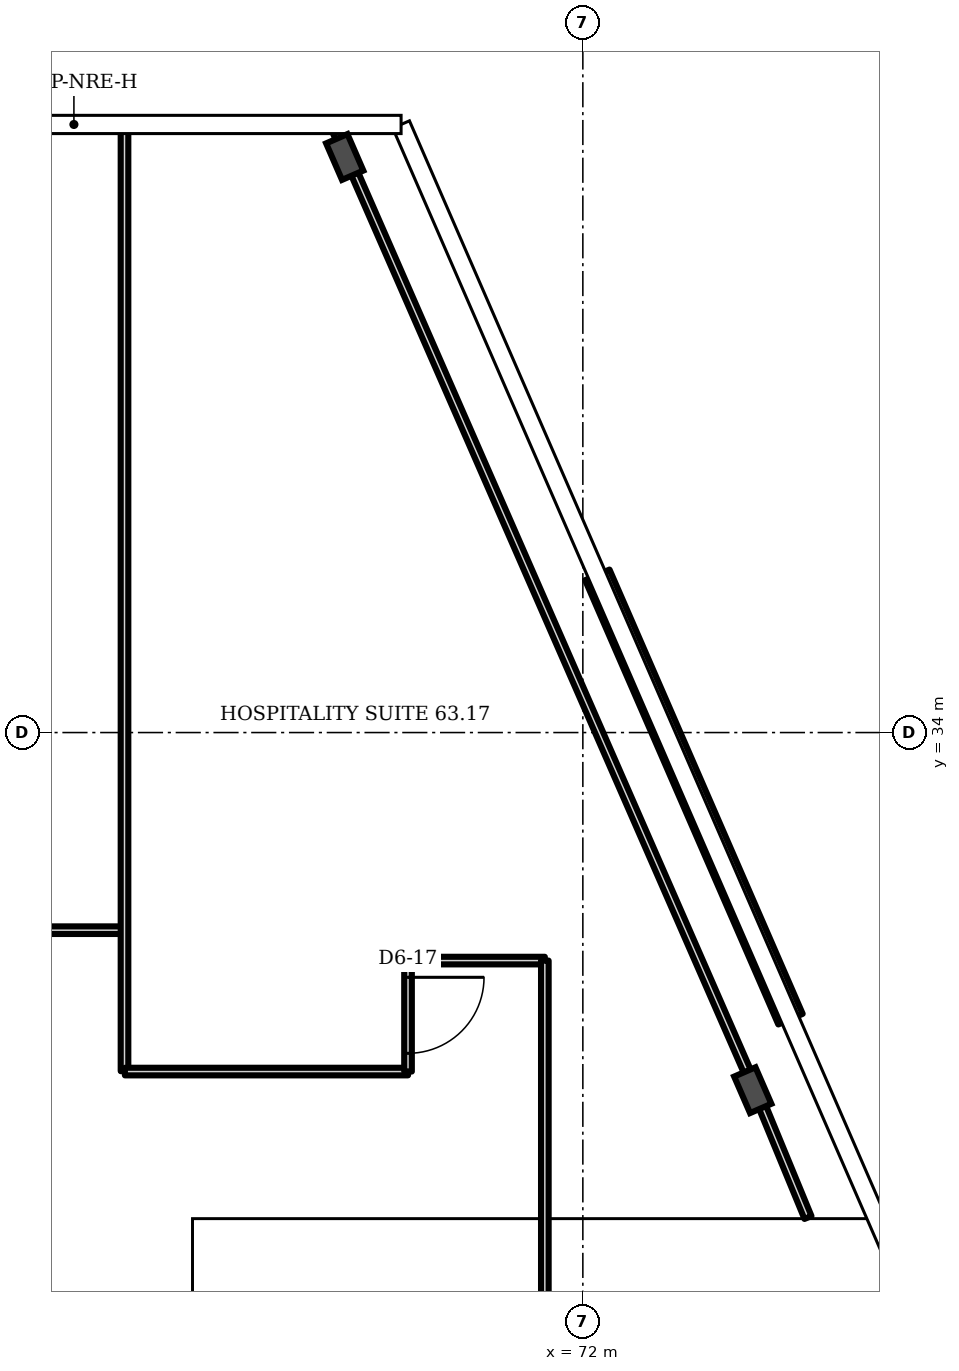
"""IFC4 building model, lengths in metres.
Left out: names, types, materials, properties, quantities, classifications, styles, units other than length and angle.
Written with IfcOpenShell. Run it as: python <this file> out.ifc"""

import sys

from ifc_helpers import new_model, si_unit, direction, frame, frame_2d, origin, origin_2d, place, context, subcontext, project, spatial, rectangle, i_section, extrude, element, fill, save


model = new_model("IFC4")
c1 = context("Model", 3, precision=1e-05, world=origin(), true_north=direction((0.0, 1.0)))
c2 = subcontext(c1, "Body", "Model", "MODEL_VIEW")
j1 = project(units=[si_unit("LENGTHUNIT", "METRE"), si_unit("PLANEANGLEUNIT", "RADIAN")], contexts=[c1])
p1 = place(None, origin())
s1 = spatial("IfcSite", under=j1, at=p1, CompositionType="ELEMENT")
p2 = place(p1, origin())
s2 = spatial("IfcBuilding", under=s1, at=p2, CompositionType="ELEMENT")
p3 = place(p2, frame((0.0, 0.0, 250.3)))
s3 = spatial("IfcBuildingStorey", under=s2, at=p3, CompositionType="ELEMENT", Elevation=250.3)
for number, where, z_axis, x_axis in (
    (1, (74.235, 29.295, 0.0), (0.0, 0.0, 1.0), (0.917, 0.399, 0.0)),
    (2, (68.867, 41.572, 0.0), (0.0, 0.0, 1.0), (0.917, 0.399, 0.0)),
):
    element("IfcColumn", number, at=place(p3, frame(where, z_axis=z_axis, x_axis=x_axis)), inside=s3, PredefinedType="COLUMN", context=c2, shape_type="SweptSolid", body=[
        extrude(i_section(OverallWidth=0.306, OverallDepth=0.524, WebThickness=0.021, FlangeThickness=0.04, FilletRadius=0.027, at=origin_2d()), origin(), (0.0, 0.0, 1.0), 3.6),
    ])
p4 = place(p3, frame((74.732, 30.229, 0.0), z_axis=(0.0, 0.0, 1.0), x_axis=(-0.398722, 0.917072, 0.0)))
e3 = element("IfcWall", 3, at=p4, inside=s3, PredefinedType="SOLIDWALL", context=c2, shape_type="SweptSolid", body=[
    extrude(rectangle(XDim=6.374, YDim=0.35, at=frame_2d((3.187, 0.0))), origin(), (0.0, 0.0, 1.0), 1.0),
])
p5 = place(p3, frame((58.0, 31.4, 0.0), z_axis=(0.0, 0.0, 1.0), x_axis=(1.0, 0.0, 0.0)))
e4 = element("IfcWall", 4, at=p5, inside=s3, PredefinedType="PARTITIONING", context=c2, shape_type="SweptSolid", body=[
    extrude(rectangle(XDim=7.97, YDim=0.1, at=frame_2d((3.985, 0.0))), origin(), (0.0, 0.0, 1.0), 3.2),
])
p6 = place(p5, frame((2.15, 0.0, 0.0)))
e5 = element("IfcOpeningElement", 5, at=p6, cuts=e4, PredefinedType="OPENING", context=c2, shape_type="SweptSolid", body=[
    extrude(rectangle(XDim=1.0, YDim=2.1, at=frame_2d((0.5, 1.05))), frame((0.0, 0.06, 0.0), z_axis=(0.0, -1.0, 0.0), x_axis=(1.0, 0.0, 0.0)), (0.0, 0.0, 1.0), 0.12),
])
p7 = place(p3, frame((65.97, 29.545, 0.0), z_axis=(0.0, 0.0, 1.0), x_axis=(0.0, 1.0, 0.0)))
e6 = element("IfcWall", 6, at=p7, inside=s3, PredefinedType="PARTITIONING", context=c2, shape_type="SweptSolid", body=[
    extrude(rectangle(XDim=12.435, YDim=0.1, at=frame_2d((6.218, 0.0))), origin(), (0.0, 0.0, 1.0), 3.2),
])
p8 = place(p3, frame((65.975, 29.54, 0.0), z_axis=(0.0, 0.0, 1.0), x_axis=(1.0, 0.0, 0.0)))
e7 = element("IfcWall", 7, at=p8, inside=s3, PredefinedType="PARTITIONING", context=c2, shape_type="SweptSolid", body=[
    extrude(rectangle(XDim=3.725, YDim=0.1, at=frame_2d((1.862, 0.0))), origin(), (0.0, 0.0, 1.0), 3.2),
])
p9 = place(p3, frame((69.7, 29.54, 0.0), z_axis=(0.0, 0.0, 1.0), x_axis=(0.0, 1.0, 0.0)))
e8 = element("IfcWall", 8, at=p9, inside=s3, PredefinedType="PARTITIONING", context=c2, shape_type="SweptSolid", body=[
    extrude(rectangle(XDim=1.46, YDim=0.1, at=frame_2d((0.73, 0.0))), origin(), (0.0, 0.0, 1.0), 3.2),
])
p10 = place(p9, frame((0.24, 0.0, 0.0)))
e9 = element("IfcOpeningElement", 9, at=p10, cuts=e8, PredefinedType="OPENING", context=c2, shape_type="SweptSolid", body=[
    extrude(rectangle(XDim=1.0, YDim=2.1, at=frame_2d((0.5, 1.05))), frame((0.0, 0.06, 0.0), z_axis=(0.0, -1.0, 0.0), x_axis=(1.0, 0.0, 0.0)), (0.0, 0.0, 1.0), 0.12),
])
p11 = place(p3, frame((69.7, 31.0, 0.0), z_axis=(0.0, 0.0, 1.0), x_axis=(1.0, 0.0, 0.0)))
e10 = element("IfcWall", 10, at=p11, inside=s3, PredefinedType="PARTITIONING", context=c2, shape_type="SweptSolid", body=[
    extrude(rectangle(XDim=1.8, YDim=0.1, at=frame_2d((0.9, 0.0))), origin(), (0.0, 0.0, 1.0), 3.2),
])
p12 = place(p3, frame((71.5, 26.125, 0.0), z_axis=(0.0, 0.0, 1.0), x_axis=(0.0, 1.0, 0.0)))
e11 = element("IfcWall", 11, at=p12, inside=s3, PredefinedType="PARTITIONING", context=c2, shape_type="SweptSolid", body=[
    extrude(rectangle(XDim=4.875, YDim=0.1, at=frame_2d((2.438, 0.0))), origin(), (0.0, 0.0, 1.0), 3.2),
])
p13 = place(p3, frame((74.265, 29.31, 0.0), z_axis=(0.0, 0.0, 1.0), x_axis=(-0.400709, 0.916209, 0.0)))
e12 = element("IfcWall", 12, at=p13, inside=s3, PredefinedType="PARTITIONING", context=c2, shape_type="SweptSolid", body=[
    extrude(rectangle(XDim=13.829, YDim=0.1, at=frame_2d((6.914, 0.0))), origin(), (0.0, 0.0, 1.0), 2.58),
])
p14 = place(p3, frame((74.962, 27.62, 0.0), z_axis=(0.0, 0.0, 1.0), x_axis=(-0.381293, 0.924452, 0.0)))
e13 = element("IfcWall", 13, at=p14, inside=s3, PredefinedType="PARTITIONING", context=c2, shape_type="SweptSolid", body=[
    extrude(rectangle(XDim=1.828, YDim=0.1, at=frame_2d((0.914, 0.0))), origin(), (0.0, 0.0, 1.0), 2.58),
])
p15 = place(p10, origin())
e14 = element("IfcDoor", 14, at=p15, inside=s3, OperationType="SINGLE_SWING_RIGHT", PredefinedType="DOOR", context=c2, shape_type="SweptSolid", body=[
    extrude(rectangle(XDim=1.0, YDim=2.1, at=frame_2d((0.5, 1.05))), frame((0.0, 0.025, 0.0), z_axis=(0.0, -1.0, 0.0), x_axis=(1.0, 0.0, 0.0)), (0.0, 0.0, 1.0), 0.05),
])
fill(e9, e14)
save(model, sys.argv[1])
